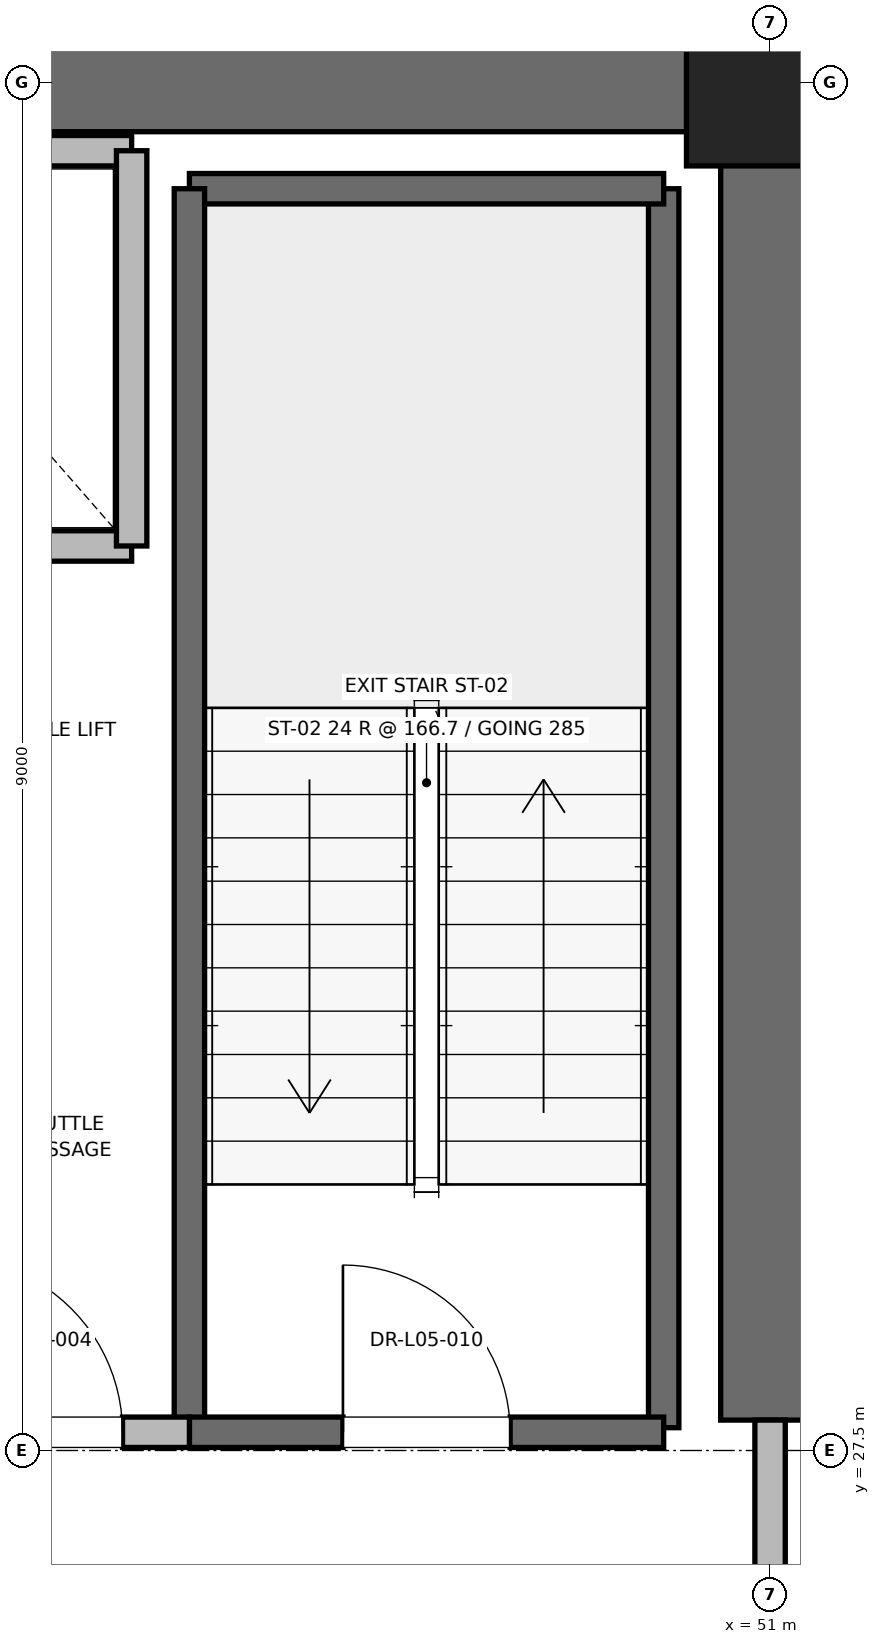
"""IFC4 building model, lengths in metres.
Left out: names, types, materials, properties, quantities, classifications, styles, units other than length and angle.
Written with IfcOpenShell. Run it as: python <this file> out.ifc"""

import sys

from ifc_helpers import new_model, si_unit, direction, frame, frame_2d, origin, origin_2d, place, context, subcontext, project, spatial, rectangle, extrude, element, fill, save


model = new_model("IFC4")
c1 = context("Model", 3, precision=1e-05, world=origin(), true_north=direction((0.0, 1.0)))
c2 = subcontext(c1, "Body", "Model", "MODEL_VIEW")
j1 = project(units=[si_unit("LENGTHUNIT", "METRE"), si_unit("PLANEANGLEUNIT", "RADIAN")], contexts=[c1])
p1 = place(None, origin())
s1 = spatial("IfcSite", under=j1, at=p1, CompositionType="ELEMENT")
p2 = place(p1, origin())
s2 = spatial("IfcBuilding", under=s1, at=p2, CompositionType="ELEMENT")
p3 = place(p2, frame((0.0, 0.0, 27.6)))
s3 = spatial("IfcBuildingStorey", under=s2, at=p3, CompositionType="ELEMENT", Elevation=27.6)
p4 = place(p3, frame((51.0, 36.5, 0.0), z_axis=(0.0, 0.0, 1.0), x_axis=(1.0, 0.0, 0.0)))
e1 = element("IfcColumn", 1, at=p4, inside=s3, PredefinedType="PILASTER", context=c2, shape_type="SweptSolid", body=[
    extrude(rectangle(XDim=1.1, YDim=1.1, at=origin_2d()), origin(), (0.0, 0.0, 1.0), 4.0),
])
p5 = place(p3, frame((45.2, 36.5, 0.0), z_axis=(0.0, 0.0, 1.0), x_axis=(1.0, 0.0, 0.0)))
e2 = element("IfcWall", 2, at=p5, inside=s3, PredefinedType="SHEAR", context=c2, shape_type="SweptSolid", body=[
    extrude(rectangle(XDim=5.8, YDim=0.65, at=frame_2d((2.9, 0.0))), origin(), (0.0, 0.0, 1.0), 3.76),
])
p6 = place(p3, frame((51.0, 27.7, 0.0), z_axis=(0.0, 0.0, 1.0), x_axis=(0.0, 1.0, 0.0)))
e3 = element("IfcWall", 3, at=p6, inside=s3, PredefinedType="SHEAR", context=c2, shape_type="SweptSolid", body=[
    extrude(rectangle(XDim=8.8, YDim=0.65, at=frame_2d((4.4, 0.0))), origin(), (0.0, 0.0, 1.0), 3.76),
])
p7 = place(p3, frame((50.3, 27.65, 0.0), z_axis=(0.0, 0.0, 1.0), x_axis=(0.0, 1.0, 0.0)))
e4 = element("IfcWall", 4, at=p7, inside=s3, PredefinedType="SOLIDWALL", context=c2, shape_type="SweptSolid", body=[
    extrude(rectangle(XDim=8.15, YDim=0.2, at=frame_2d((4.075, 0.0))), origin(), (0.0, 0.0, 1.0), 3.76),
])
p8 = place(p3, frame((47.18, 35.8, 0.0), z_axis=(0.0, 0.0, 1.0), x_axis=(1.0, 0.0, 0.0)))
e5 = element("IfcWall", 5, at=p8, inside=s3, PredefinedType="SOLIDWALL", context=c2, shape_type="SweptSolid", body=[
    extrude(rectangle(XDim=3.12, YDim=0.2, at=frame_2d((1.56, 0.0))), origin(), (0.0, 0.0, 1.0), 3.76),
])
p9 = place(p3, frame((47.18, 27.62, 0.0), z_axis=(0.0, 0.0, 1.0), x_axis=(0.0, 1.0, 0.0)))
e6 = element("IfcWall", 6, at=p9, inside=s3, PredefinedType="SOLIDWALL", context=c2, shape_type="SweptSolid", body=[
    extrude(rectangle(XDim=8.18, YDim=0.2, at=frame_2d((4.09, 0.0))), origin(), (0.0, 0.0, 1.0), 3.76),
])
p10 = place(p3, frame((47.18, 27.62, 0.0), z_axis=(0.0, 0.0, 1.0), x_axis=(1.0, 0.0, 0.0)))
e7 = element("IfcWall", 7, at=p10, inside=s3, PredefinedType="SOLIDWALL", context=c2, shape_type="SweptSolid", body=[
    extrude(rectangle(XDim=3.12, YDim=0.2, at=frame_2d((1.56, 0.0))), origin(), (0.0, 0.0, 1.0), 3.76),
])
p11 = place(p10, frame((1.01, 0.0, 0.0)))
e8 = element("IfcOpeningElement", 8, at=p11, cuts=e7, PredefinedType="OPENING", context=c2, shape_type="SweptSolid", body=[
    extrude(rectangle(XDim=1.1, YDim=2.15, at=frame_2d((0.55, 1.075))), frame((0.0, 0.1, 0.0), z_axis=(0.0, -1.0, 0.0), x_axis=(1.0, 0.0, 0.0)), (0.0, 0.0, 1.0), 0.2),
])
p12 = place(p3, frame((45.15, 27.62, 0.0), z_axis=(0.0, 0.0, 1.0), x_axis=(1.0, 0.0, 0.0)))
e9 = element("IfcWall", 9, at=p12, inside=s3, PredefinedType="PARTITIONING", context=c2, shape_type="SweptSolid", body=[
    extrude(rectangle(XDim=2.03, YDim=0.2, at=frame_2d((1.015, 0.0))), origin(), (0.0, 0.0, 1.0), 3.76),
])
p13 = place(p12, frame((0.44, 0.0, 0.0)))
e10 = element("IfcOpeningElement", 10, at=p13, cuts=e9, PredefinedType="OPENING", context=c2, shape_type="SweptSolid", body=[
    extrude(rectangle(XDim=1.15, YDim=2.2, at=frame_2d((0.575, 1.1))), frame((0.0, 0.1, 0.0), z_axis=(0.0, -1.0, 0.0), x_axis=(1.0, 0.0, 0.0)), (0.0, 0.0, 1.0), 0.2),
])
p14 = place(p3, frame((51.0, 24.3, 0.0), z_axis=(0.0, 0.0, 1.0), x_axis=(0.0, 1.0, 0.0)))
e11 = element("IfcWall", 11, at=p14, inside=s3, PredefinedType="PARTITIONING", context=c2, shape_type="SweptSolid", body=[
    extrude(rectangle(XDim=3.4, YDim=0.2, at=frame_2d((1.7, 0.0))), origin(), (0.0, 0.0, 1.0), 2.54),
])
p15 = place(p14, frame((1.125, 0.0, 0.0)))
e12 = element("IfcOpeningElement", 12, at=p15, cuts=e11, PredefinedType="OPENING", context=c2, shape_type="SweptSolid", body=[
    extrude(rectangle(XDim=1.15, YDim=2.2, at=frame_2d((0.575, 1.1))), frame((0.0, 0.1, 0.0), z_axis=(0.0, -1.0, 0.0), x_axis=(1.0, 0.0, 0.0)), (0.0, 0.0, 1.0), 0.2),
])
p16 = place(p3, frame((44.5, 33.45, 0.0), z_axis=(0.0, 0.0, 1.0), x_axis=(1.0, 0.0, 0.0)))
e13 = element("IfcWall", 13, at=p16, inside=s3, PredefinedType="SOLIDWALL", context=c2, shape_type="SweptSolid", body=[
    extrude(rectangle(XDim=2.3, YDim=0.2, at=frame_2d((1.15, 0.0))), origin(), (0.0, 0.0, 1.0), 3.76),
])
p17 = place(p3, frame((46.8, 36.05, 0.0), z_axis=(0.0, 0.0, 1.0), x_axis=(-1.0, 0.0, 0.0)))
e14 = element("IfcWall", 14, at=p17, inside=s3, PredefinedType="SOLIDWALL", context=c2, shape_type="SweptSolid", body=[
    extrude(rectangle(XDim=2.3, YDim=0.2, at=frame_2d((1.15, 0.0))), origin(), (0.0, 0.0, 1.0), 2.54),
])
p18 = place(p3, frame((46.8, 33.45, 0.0), z_axis=(0.0, 0.0, 1.0), x_axis=(0.0, 1.0, 0.0)))
e15 = element("IfcWall", 15, at=p18, inside=s3, PredefinedType="SOLIDWALL", context=c2, shape_type="SweptSolid", body=[
    extrude(rectangle(XDim=2.6, YDim=0.2, at=frame_2d((1.3, 0.0))), origin(), (0.0, 0.0, 1.0), 3.76),
])
p19 = place(p11, origin())
e16 = element("IfcDoor", 16, at=p19, inside=s3, OperationType="SINGLE_SWING_LEFT", PredefinedType="DOOR", context=c2, shape_type="SweptSolid", body=[
    extrude(rectangle(XDim=1.1, YDim=2.15, at=frame_2d((0.55, 1.075))), frame((0.0, 0.025, 0.0), z_axis=(0.0, -1.0, 0.0), x_axis=(1.0, 0.0, 0.0)), (0.0, 0.0, 1.0), 0.05),
])
fill(e8, e16)
p20 = place(p13, origin())
e17 = element("IfcDoor", 17, at=p20, inside=s3, OperationType="SINGLE_SWING_LEFT", PredefinedType="DOOR", context=c2, shape_type="SweptSolid", body=[
    extrude(rectangle(XDim=1.15, YDim=2.2, at=frame_2d((0.575, 1.1))), frame((0.0, 0.025, 0.0), z_axis=(0.0, -1.0, 0.0), x_axis=(1.0, 0.0, 0.0)), (0.0, 0.0, 1.0), 0.05),
])
fill(e10, e17)
save(model, sys.argv[1])
